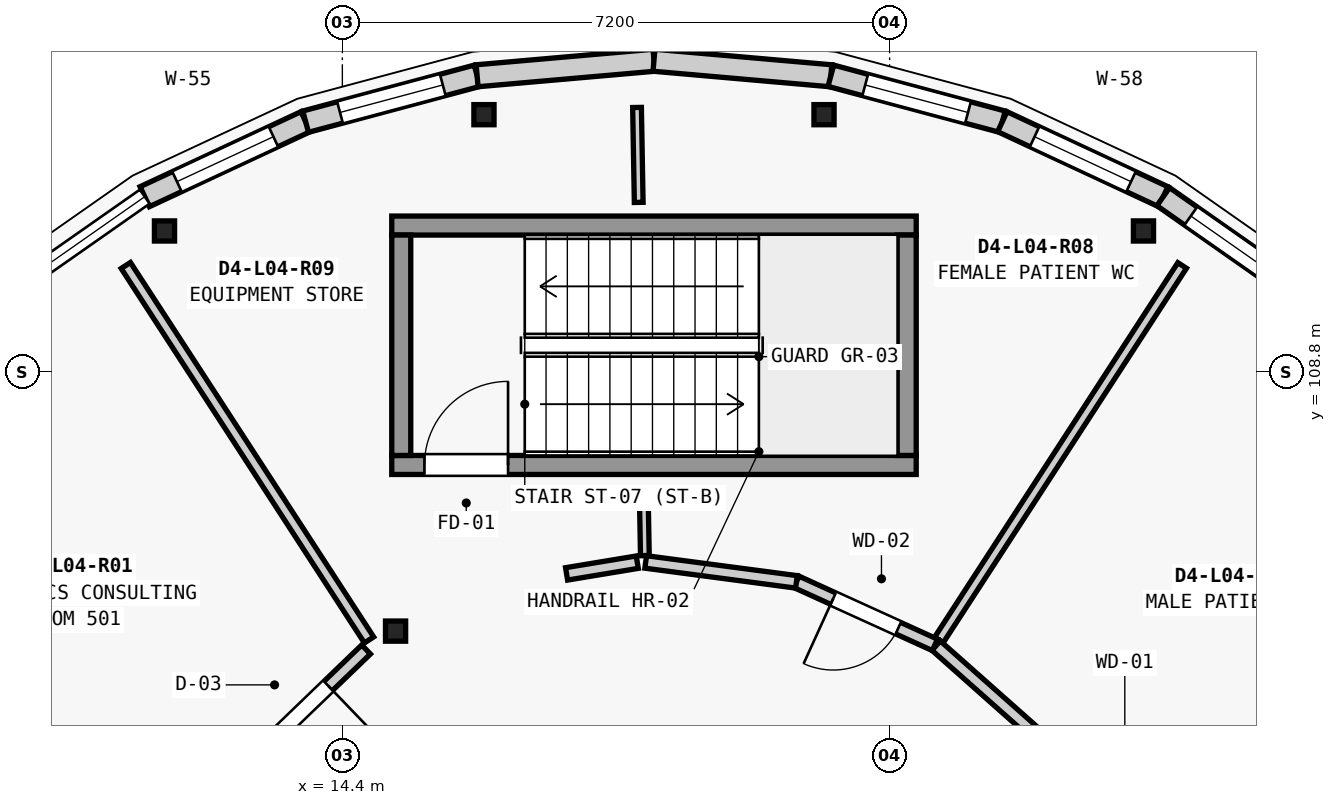
"""IFC4 building model, lengths in metres.
Left out: names, types, materials, properties, quantities, classifications, styles, units other than length and angle.
Written with IfcOpenShell. Run it as: python <this file> out.ifc"""

import sys

from ifc_helpers import new_model, si_unit, direction, frame, frame_2d, origin, origin_2d, place, context, subcontext, project, spatial, rectangle, extrude, element, fill, save


model = new_model("IFC4")
c1 = context("Model", 3, precision=1e-05, world=origin(), true_north=direction((0.0, 1.0)))
c2 = subcontext(c1, "Body", "Model", "MODEL_VIEW")
j1 = project(units=[si_unit("LENGTHUNIT", "METRE"), si_unit("PLANEANGLEUNIT", "RADIAN")], contexts=[c1])
p1 = place(None, origin())
s1 = spatial("IfcSite", under=j1, at=p1, CompositionType="ELEMENT")
p2 = place(p1, origin())
s2 = spatial("IfcBuilding", under=s1, at=p2, CompositionType="ELEMENT")
p3 = place(p2, frame((0.0, 0.0, 17.15)))
s3 = spatial("IfcBuildingStorey", under=s2, at=p3, CompositionType="ELEMENT", Elevation=17.15)
for number, where, z_axis, x_axis in (
    (1, (24.94, 110.654, 0.0), (0.0, 0.0, 1.0), (1.0, 0.0, 0.0)),
    (2, (20.737, 112.184, 0.0), (0.0, 0.0, 1.0), (1.0, 0.0, 0.0)),
    (3, (16.263, 112.184, 0.0), (0.0, 0.0, 1.0), (1.0, 0.0, 0.0)),
    (4, (12.06, 110.654, 0.0), (0.0, 0.0, 1.0), (1.0, 0.0, 0.0)),
    (5, (15.1, 105.389, 0.0), (0.0, 0.0, 1.0), (1.0, 0.0, 0.0)),
):
    element("IfcColumn", number, at=place(p3, frame(where, z_axis=z_axis, x_axis=x_axis)), inside=s3, PredefinedType="COLUMN", context=c2, shape_type="SweptSolid", body=[
        extrude(rectangle(XDim=0.265, YDim=0.265, at=origin_2d()), origin(), (0.0, 0.0, 1.0), 4.2),
    ])
p4 = place(p3, frame((11.8, 111.105, 0.0), z_axis=(0.0, 0.0, 1.0), x_axis=(0.906321946979, 0.422587894318, 0.0)))
e6 = element("IfcWall", 6, at=p4, inside=s3, PredefinedType="ELEMENTEDWALL", context=c2, shape_type="SweptSolid", body=[
    extrude(rectangle(XDim=2.336, YDim=0.29, at=frame_2d((1.168, 0.0))), origin(), (0.0, 0.0, 1.0), 3.369),
])
p5 = place(p4, frame((0.468, 0.0, 0.85)))
e7 = element("IfcOpeningElement", 7, at=p5, cuts=e6, PredefinedType="OPENING", context=c2, shape_type="SweptSolid", body=[
    extrude(rectangle(XDim=1.4, YDim=1.25, at=frame_2d((0.7, 0.625))), frame((0.0, 0.155, 0.0), z_axis=(0.0, -1.0, 0.0), x_axis=(1.0, 0.0, 0.0)), (0.0, 0.0, 1.0), 0.31),
])
p6 = place(p3, frame((13.917, 112.092, 0.0), z_axis=(0.0, 0.0, 1.0), x_axis=(0.965981166673, 0.258612423585, 0.0)))
e8 = element("IfcWall", 8, at=p6, inside=s3, PredefinedType="ELEMENTEDWALL", context=c2, shape_type="SweptSolid", body=[
    extrude(rectangle(XDim=2.335, YDim=0.29, at=frame_2d((1.168, 0.0))), origin(), (0.0, 0.0, 1.0), 3.369),
])
p7 = place(p6, frame((0.468, 0.0, 0.85)))
e9 = element("IfcOpeningElement", 9, at=p7, cuts=e8, PredefinedType="OPENING", context=c2, shape_type="SweptSolid", body=[
    extrude(rectangle(XDim=1.4, YDim=1.6, at=frame_2d((0.7, 0.8))), frame((0.0, 0.155, 0.0), z_axis=(0.0, -1.0, 0.0), x_axis=(1.0, 0.0, 0.0)), (0.0, 0.0, 1.0), 0.31),
])
for number, where, z_axis, x_axis in (
    (10, (16.173, 112.696, 0.0), (0.0, 0.0, 1.0), (0.996, 0.087, 0.0)),
    (11, (18.5, 112.9, 0.0), (0.0, 0.0, 1.0), (0.996, -0.087, 0.0)),
):
    element("IfcWall", number, at=place(p3, frame(where, z_axis=z_axis, x_axis=x_axis)), inside=s3, PredefinedType="ELEMENTEDWALL", context=c2, shape_type="SweptSolid", body=[
        extrude(rectangle(XDim=2.336, YDim=0.29, at=frame_2d((1.168, 0.0))), origin(), (0.0, 0.0, 1.0), 3.369),
    ])
p8 = place(p3, frame((20.827, 112.696, 0.0), z_axis=(0.0, 0.0, 1.0), x_axis=(0.965981166673, -0.258612423585, 0.0)))
e12 = element("IfcWall", 12, at=p8, inside=s3, PredefinedType="ELEMENTEDWALL", context=c2, shape_type="SweptSolid", body=[
    extrude(rectangle(XDim=2.335, YDim=0.29, at=frame_2d((1.168, 0.0))), origin(), (0.0, 0.0, 1.0), 3.369),
])
p9 = place(p8, frame((0.468, 0.0, 0.85)))
e13 = element("IfcOpeningElement", 13, at=p9, cuts=e12, PredefinedType="OPENING", context=c2, shape_type="SweptSolid", body=[
    extrude(rectangle(XDim=1.4, YDim=1.9, at=frame_2d((0.7, 0.95))), frame((0.0, 0.155, 0.0), z_axis=(0.0, -1.0, 0.0), x_axis=(1.0, 0.0, 0.0)), (0.0, 0.0, 1.0), 0.31),
])
p10 = place(p3, frame((23.083, 112.092, 0.0), z_axis=(0.0, 0.0, 1.0), x_axis=(0.906321946979, -0.422587894318, 0.0)))
e14 = element("IfcWall", 14, at=p10, inside=s3, PredefinedType="ELEMENTEDWALL", context=c2, shape_type="SweptSolid", body=[
    extrude(rectangle(XDim=2.336, YDim=0.29, at=frame_2d((1.168, 0.0))), origin(), (0.0, 0.0, 1.0), 3.369),
])
p11 = place(p10, frame((0.468, 0.0, 0.85)))
e15 = element("IfcOpeningElement", 15, at=p11, cuts=e14, PredefinedType="OPENING", context=c2, shape_type="SweptSolid", body=[
    extrude(rectangle(XDim=1.4, YDim=2.2, at=frame_2d((0.7, 1.1))), frame((0.0, 0.155, 0.0), z_axis=(0.0, -1.0, 0.0), x_axis=(1.0, 0.0, 0.0)), (0.0, 0.0, 1.0), 0.31),
])
p12 = place(p3, frame((25.2, 111.105, 0.0), z_axis=(0.0, 0.0, 1.0), x_axis=(0.819045278347, -0.573728883722, 0.0)))
e16 = element("IfcWall", 16, at=p12, inside=s3, PredefinedType="ELEMENTEDWALL", context=c2, shape_type="SweptSolid", body=[
    extrude(rectangle(XDim=2.336, YDim=0.29, at=frame_2d((1.168, 0.0))), origin(), (0.0, 0.0, 1.0), 3.369),
])
p13 = place(p12, frame((0.443, 0.0, 0.85)))
e17 = element("IfcOpeningElement", 17, at=p13, cuts=e16, PredefinedType="OPENING", context=c2, shape_type="SweptSolid", body=[
    extrude(rectangle(XDim=1.45, YDim=1.45, at=frame_2d((0.725, 0.725))), frame((0.0, 0.155, 0.0), z_axis=(0.0, -1.0, 0.0), x_axis=(1.0, 0.0, 0.0)), (0.0, 0.0, 1.0), 0.31),
])
p14 = place(p3, frame((15.05, 107.575, 0.0), z_axis=(0.0, 0.0, 1.0), x_axis=(1.0, 0.0, 0.0)))
e18 = element("IfcWall", 18, at=p14, inside=s3, PredefinedType="SHEAR", context=c2, shape_type="SweptSolid", body=[
    extrude(rectangle(XDim=6.9, YDim=0.25, at=frame_2d((3.45, 0.0))), origin(), (0.0, 0.0, 1.0), 4.015),
])
p15 = place(p14, frame((0.43, 0.0, 0.0)))
e19 = element("IfcOpeningElement", 19, at=p15, cuts=e18, PredefinedType="OPENING", context=c2, shape_type="SweptSolid", body=[
    extrude(rectangle(XDim=1.1, YDim=2.15, at=frame_2d((0.55, 1.075))), frame((0.0, 0.135, 0.0), z_axis=(0.0, -1.0, 0.0), x_axis=(1.0, 0.0, 0.0)), (0.0, 0.0, 1.0), 0.27),
])
p16 = place(p3, frame((15.05, 110.725, 0.0), z_axis=(0.0, 0.0, 1.0), x_axis=(1.0, 0.0, 0.0)))
e20 = element("IfcWall", 20, at=p16, inside=s3, PredefinedType="SHEAR", context=c2, shape_type="SweptSolid", body=[
    extrude(rectangle(XDim=6.9, YDim=0.25, at=frame_2d((3.45, 0.0))), origin(), (0.0, 0.0, 1.0), 4.015),
])
for number, where, z_axis, x_axis in (
    (21, (15.175, 107.7, 0.0), (0.0, 0.0, 1.0), (0.0, 1.0, 0.0)),
    (22, (21.825, 107.7, 0.0), (0.0, 0.0, 1.0), (0.0, 1.0, 0.0)),
):
    element("IfcWall", number, at=place(p3, frame(where, z_axis=z_axis, x_axis=x_axis)), inside=s3, PredefinedType="SHEAR", context=c2, shape_type="SweptSolid", body=[
        extrude(rectangle(XDim=2.9, YDim=0.25, at=frame_2d((1.45, 0.0))), origin(), (0.0, 0.0, 1.0), 4.015),
    ])
p17 = place(p3, frame((14.751, 105.273, 0.0), z_axis=(0.0, 0.0, 1.0), x_axis=(-0.544677189284, 0.838645789039, 0.0)))
e23 = element("IfcWall", 23, at=p17, inside=s3, PredefinedType="PARTITIONING", context=c2, shape_type="SweptSolid", body=[
    extrude(rectangle(XDim=5.875, YDim=0.145, at=frame_2d((2.938, 0.0))), origin(), (0.0, 0.0, 1.0), 3.344),
])
p18 = place(p3, frame((24.836, 102.189, 0.0), z_axis=(0.0, 0.0, 1.0), x_axis=(0.920468107404, 0.390817685438, 0.0)))
e24 = element("IfcWall", 24, at=p18, inside=s3, PredefinedType="PLUMBINGWALL", context=c2, shape_type="SweptSolid", body=[
    extrude(rectangle(XDim=5.875, YDim=0.135, at=frame_2d((2.938, 0.0))), origin(), (0.0, 0.0, 1.0), 3.344),
])
p19 = place(p3, frame((22.249, 105.273, 0.0), z_axis=(0.0, 0.0, 1.0), x_axis=(0.544677189284, 0.838645789039, 0.0)))
e25 = element("IfcWall", 25, at=p19, inside=s3, PredefinedType="PLUMBINGWALL", context=c2, shape_type="SweptSolid", body=[
    extrude(rectangle(XDim=5.875, YDim=0.135, at=frame_2d((2.938, 0.0))), origin(), (0.0, 0.0, 1.0), 3.344),
])
p20 = place(p3, frame((18.38, 106.382, 0.0), z_axis=(0.0, 0.0, 1.0), x_axis=(-0.017869018934, 0.999840336335, 0.0)))
e26 = element("IfcWall", 26, at=p20, inside=s3, PredefinedType="PARTITIONING", context=c2, shape_type="SweptSolid", body=[
    extrude(rectangle(XDim=0.888, YDim=0.115, at=frame_2d((0.444, 0.0))), origin(), (0.0, 0.0, 1.0), 3.344),
])
p21 = place(p3, frame((18.299, 111.03, 0.0), z_axis=(0.0, 0.0, 1.0), x_axis=(-0.017589147167, 0.999845298985, 0.0)))
e27 = element("IfcWall", 27, at=p21, inside=s3, PredefinedType="PARTITIONING", context=c2, shape_type="SweptSolid", body=[
    extrude(rectangle(XDim=1.249, YDim=0.115, at=frame_2d((0.625, 0.0))), origin(), (0.0, 0.0, 1.0), 3.344),
])
p22 = place(p3, frame((14.712, 105.147, 0.0), z_axis=(0.0, 0.0, 1.0), x_axis=(-0.720225223762, -0.693740316731, 0.0)))
e28 = element("IfcWall", 28, at=p22, inside=s3, PredefinedType="PARTITIONING", context=c2, shape_type="SweptSolid", body=[
    extrude(rectangle(XDim=2.378, YDim=0.165, at=frame_2d((1.189, 0.0))), origin(), (0.0, 0.0, 1.0), 3.344),
])
p23 = place(p22, frame((0.69, 0.0, 0.0)))
e29 = element("IfcOpeningElement", 29, at=p23, cuts=e28, PredefinedType="OPENING", context=c2, shape_type="SweptSolid", body=[
    extrude(rectangle(XDim=1.0, YDim=2.14, at=frame_2d((0.5, 1.07))), frame((0.0, 0.093, 0.0), z_axis=(0.0, -1.0, 0.0), x_axis=(1.0, 0.0, 0.0)), (0.0, 0.0, 1.0), 0.185),
])
p24 = place(p3, frame((23.606, 103.962, 0.0), z_axis=(0.0, 0.0, 1.0), x_axis=(-0.748225706364, 0.66344426468, 0.0)))
e30 = element("IfcWall", 30, at=p24, inside=s3, PredefinedType="PARTITIONING", context=c2, shape_type="SweptSolid", body=[
    extrude(rectangle(XDim=1.863, YDim=0.165, at=frame_2d((0.932, 0.0))), origin(), (0.0, 0.0, 1.0), 3.344),
])
p25 = place(p3, frame((22.196, 105.208, 0.0), z_axis=(0.0, 0.0, 1.0), x_axis=(-0.910195152859, 0.414179651495, 0.0)))
e31 = element("IfcWall", 31, at=p25, inside=s3, PredefinedType="PARTITIONING", context=c2, shape_type="SweptSolid", body=[
    extrude(rectangle(XDim=2.002, YDim=0.165, at=frame_2d((1.001, 0.0))), origin(), (0.0, 0.0, 1.0), 3.344),
])
p26 = place(p25, frame((0.53, 0.0, 0.0)))
e32 = element("IfcOpeningElement", 32, at=p26, cuts=e31, PredefinedType="OPENING", context=c2, shape_type="SweptSolid", body=[
    extrude(rectangle(XDim=0.94, YDim=2.1, at=frame_2d((0.47, 1.05))), frame((0.0, 0.093, 0.0), z_axis=(0.0, -1.0, 0.0), x_axis=(1.0, 0.0, 0.0)), (0.0, 0.0, 1.0), 0.185),
])
p27 = place(p3, frame((20.374, 106.037, 0.0), z_axis=(0.0, 0.0, 1.0), x_axis=(-0.991386025062, 0.13097232269, 0.0)))
e33 = element("IfcWall", 33, at=p27, inside=s3, PredefinedType="PARTITIONING", context=c2, shape_type="SweptSolid", body=[
    extrude(rectangle(XDim=2.0, YDim=0.165, at=frame_2d((1.0, 0.0))), origin(), (0.0, 0.0, 1.0), 3.344),
])
p28 = place(p3, frame((18.28, 106.296, 0.0), z_axis=(0.0, 0.0, 1.0), x_axis=(-0.986596185152, -0.163180781477, 0.0)))
e34 = element("IfcWall", 34, at=p28, inside=s3, PredefinedType="PARTITIONING", context=c2, shape_type="SweptSolid", body=[
    extrude(rectangle(XDim=0.943, YDim=0.165, at=frame_2d((0.471, 0.0))), origin(), (0.0, 0.0, 1.0), 3.344),
])
p29 = place(p5, origin())
e35 = element("IfcWindow", 35, at=p29, inside=s3, PartitioningType="SINGLE_PANEL", PredefinedType="WINDOW", context=c2, shape_type="SweptSolid", body=[
    extrude(rectangle(XDim=1.4, YDim=1.25, at=frame_2d((0.7, 0.625))), frame((0.0, 0.03, 0.0), z_axis=(0.0, -1.0, 0.0), x_axis=(1.0, 0.0, 0.0)), (0.0, 0.0, 1.0), 0.06),
])
fill(e7, e35)
p30 = place(p7, origin())
e36 = element("IfcWindow", 36, at=p30, inside=s3, PartitioningType="SINGLE_PANEL", PredefinedType="WINDOW", context=c2, shape_type="SweptSolid", body=[
    extrude(rectangle(XDim=1.4, YDim=1.6, at=frame_2d((0.7, 0.8))), frame((0.0, 0.03, 0.0), z_axis=(0.0, -1.0, 0.0), x_axis=(1.0, 0.0, 0.0)), (0.0, 0.0, 1.0), 0.06),
])
fill(e9, e36)
p31 = place(p9, origin())
e37 = element("IfcWindow", 37, at=p31, inside=s3, PartitioningType="SINGLE_PANEL", PredefinedType="WINDOW", context=c2, shape_type="SweptSolid", body=[
    extrude(rectangle(XDim=1.4, YDim=1.9, at=frame_2d((0.7, 0.95))), frame((0.0, 0.03, 0.0), z_axis=(0.0, -1.0, 0.0), x_axis=(1.0, 0.0, 0.0)), (0.0, 0.0, 1.0), 0.06),
])
fill(e13, e37)
p32 = place(p11, origin())
e38 = element("IfcWindow", 38, at=p32, inside=s3, PartitioningType="SINGLE_PANEL", PredefinedType="WINDOW", context=c2, shape_type="SweptSolid", body=[
    extrude(rectangle(XDim=1.4, YDim=2.2, at=frame_2d((0.7, 1.1))), frame((0.0, 0.03, 0.0), z_axis=(0.0, -1.0, 0.0), x_axis=(1.0, 0.0, 0.0)), (0.0, 0.0, 1.0), 0.06),
])
fill(e15, e38)
p33 = place(p13, origin())
e39 = element("IfcWindow", 39, at=p33, inside=s3, PartitioningType="SINGLE_PANEL", PredefinedType="WINDOW", context=c2, shape_type="SweptSolid", body=[
    extrude(rectangle(XDim=1.45, YDim=1.45, at=frame_2d((0.725, 0.725))), frame((0.0, 0.03, 0.0), z_axis=(0.0, -1.0, 0.0), x_axis=(1.0, 0.0, 0.0)), (0.0, 0.0, 1.0), 0.06),
])
fill(e17, e39)
p34 = place(p15, origin())
e40 = element("IfcDoor", 40, at=p34, inside=s3, OperationType="SINGLE_SWING_RIGHT", PredefinedType="DOOR", context=c2, shape_type="SweptSolid", body=[
    extrude(rectangle(XDim=1.1, YDim=2.15, at=frame_2d((0.55, 1.075))), frame((0.0, 0.025, 0.0), z_axis=(0.0, -1.0, 0.0), x_axis=(1.0, 0.0, 0.0)), (0.0, 0.0, 1.0), 0.05),
])
fill(e19, e40)
p35 = place(p23, origin())
e41 = element("IfcDoor", 41, at=p35, inside=s3, OperationType="SINGLE_SWING_LEFT", PredefinedType="DOOR", context=c2, shape_type="SweptSolid", body=[
    extrude(rectangle(XDim=1.0, YDim=2.14, at=frame_2d((0.5, 1.07))), frame((0.0, 0.025, 0.0), z_axis=(0.0, -1.0, 0.0), x_axis=(1.0, 0.0, 0.0)), (0.0, 0.0, 1.0), 0.05),
])
fill(e29, e41)
p36 = place(p26, origin())
e42 = element("IfcDoor", 42, at=p36, inside=s3, OperationType="SINGLE_SWING_RIGHT", PredefinedType="DOOR", context=c2, shape_type="SweptSolid", body=[
    extrude(rectangle(XDim=0.94, YDim=2.1, at=frame_2d((0.47, 1.05))), frame((0.0, 0.025, 0.0), z_axis=(0.0, -1.0, 0.0), x_axis=(1.0, 0.0, 0.0)), (0.0, 0.0, 1.0), 0.05),
])
fill(e32, e42)
save(model, sys.argv[1])
